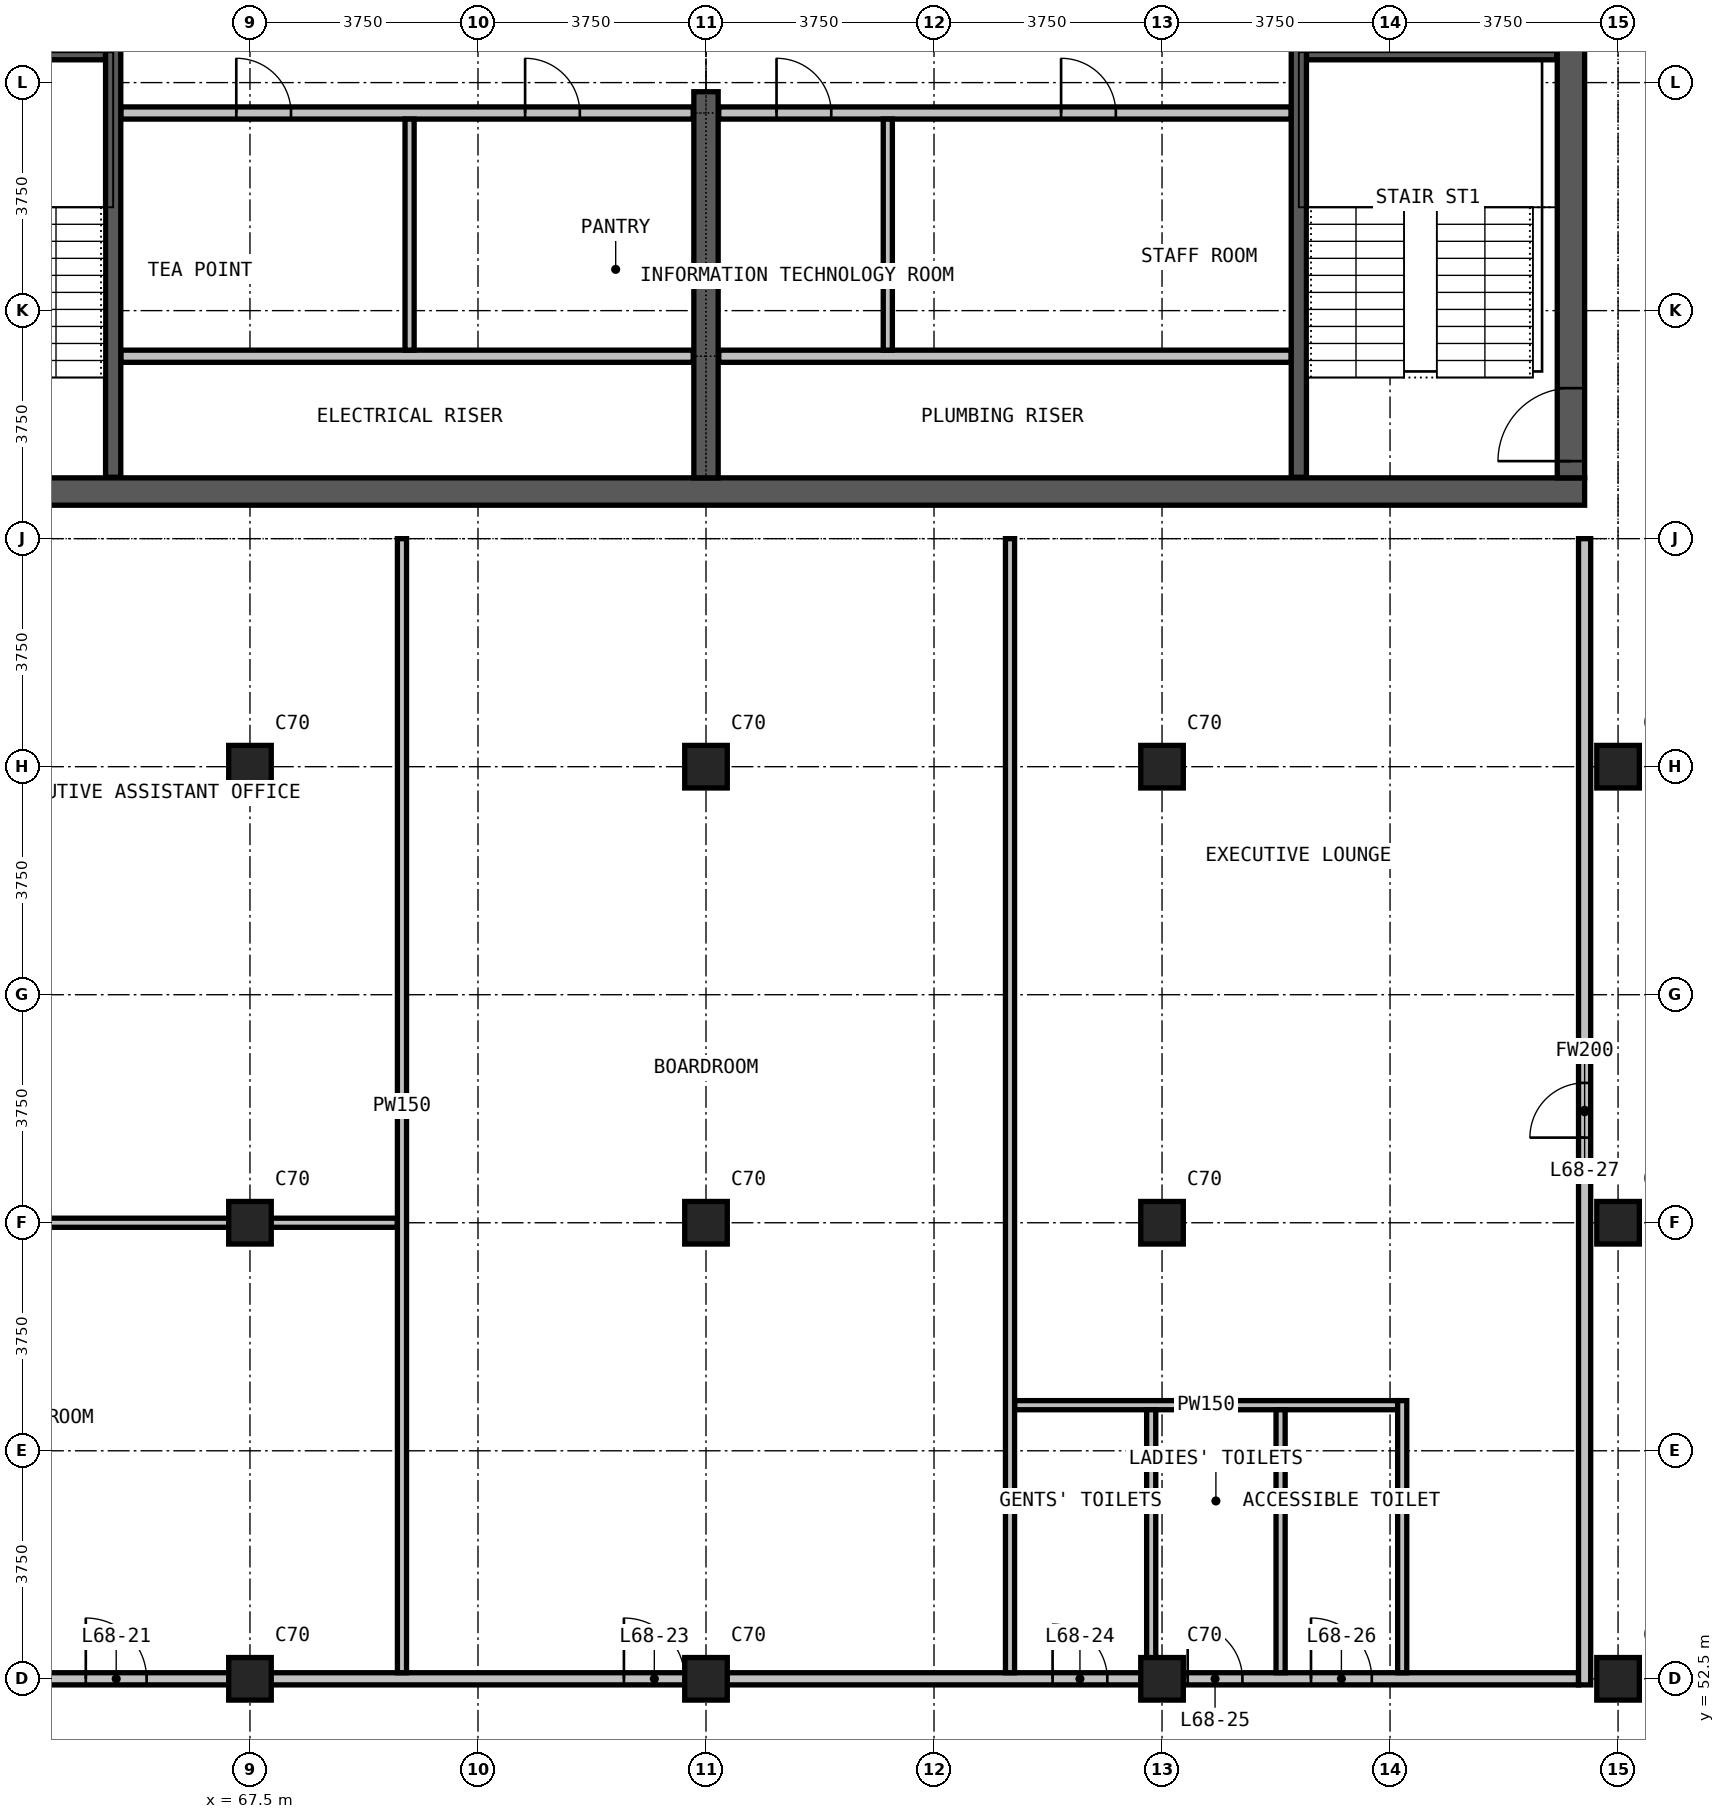
"""IFC4 building model, lengths in metres.
Left out: names, types, materials, properties, quantities, classifications, styles, units other than length and angle.
Written with IfcOpenShell. Run it as: python <this file> out.ifc"""

import sys

from ifc_helpers import new_model, si_unit, direction, frame, frame_2d, origin, origin_2d, place, context, subcontext, project, spatial, rectangle, extrude, element, fill, save


model = new_model("IFC4")
c1 = context("Model", 3, precision=1e-05, world=origin(), true_north=direction((0.0, 1.0)))
c2 = subcontext(c1, "Body", "Model", "MODEL_VIEW")
j1 = project(units=[si_unit("LENGTHUNIT", "METRE"), si_unit("PLANEANGLEUNIT", "RADIAN")], contexts=[c1])
p1 = place(None, origin())
s1 = spatial("IfcSite", under=j1, at=p1, CompositionType="ELEMENT")
p2 = place(p1, origin())
s2 = spatial("IfcBuilding", under=s1, at=p2, CompositionType="ELEMENT")
p3 = place(p2, frame((0.0, 0.0, 262.1)))
s3 = spatial("IfcBuildingStorey", under=s2, at=p3, CompositionType="ELEMENT", Elevation=262.1)
for number, where, z_axis, x_axis in (
    (1, (67.5, 52.5, 0.0), (0.0, 0.0, 1.0), (1.0, 0.0, 0.0)),
    (2, (67.5, 60.0, 0.0), (0.0, 0.0, 1.0), (1.0, 0.0, 0.0)),
    (3, (67.5, 67.5, 0.0), (0.0, 0.0, 1.0), (1.0, 0.0, 0.0)),
    (4, (75.0, 52.5, 0.0), (0.0, 0.0, 1.0), (1.0, 0.0, 0.0)),
    (5, (75.0, 60.0, 0.0), (0.0, 0.0, 1.0), (1.0, 0.0, 0.0)),
    (6, (75.0, 67.5, 0.0), (0.0, 0.0, 1.0), (1.0, 0.0, 0.0)),
    (7, (82.5, 52.5, 0.0), (0.0, 0.0, 1.0), (1.0, 0.0, 0.0)),
    (8, (82.5, 60.0, 0.0), (0.0, 0.0, 1.0), (1.0, 0.0, 0.0)),
    (9, (82.5, 67.5, 0.0), (0.0, 0.0, 1.0), (1.0, 0.0, 0.0)),
    (10, (90.0, 52.5, 0.0), (0.0, 0.0, 1.0), (1.0, 0.0, 0.0)),
    (11, (90.0, 60.0, 0.0), (0.0, 0.0, 1.0), (1.0, 0.0, 0.0)),
    (12, (90.0, 67.5, 0.0), (0.0, 0.0, 1.0), (1.0, 0.0, 0.0)),
):
    element("IfcColumn", number, at=place(p3, frame(where, z_axis=z_axis, x_axis=x_axis)), inside=s3, PredefinedType="COLUMN", context=c2, shape_type="SweptSolid", body=[
        extrude(rectangle(XDim=0.7, YDim=0.7, at=origin_2d()), origin(), (0.0, 0.0, 1.0), 3.6),
    ])
p4 = place(p3, frame((60.55, 72.025, 0.0), z_axis=(0.0, 0.0, 1.0), x_axis=(1.0, 0.0, 0.0)))
e13 = element("IfcWall", 13, at=p4, inside=s3, PredefinedType="SHEAR", context=c2, shape_type="SweptSolid", body=[
    extrude(rectangle(XDim=28.9, YDim=0.45, at=frame_2d((14.45, 0.0))), origin(), (0.0, 0.0, 1.0), 3.6),
])
p5 = place(p3, frame((89.225, 72.25, 0.0), z_axis=(0.0, 0.0, 1.0), x_axis=(0.0, 1.0, 0.0)))
e14 = element("IfcWall", 14, at=p5, inside=s3, PredefinedType="SHEAR", context=c2, shape_type="SweptSolid", body=[
    extrude(rectangle(XDim=20.5, YDim=0.45, at=frame_2d((10.25, 0.0))), origin(), (0.0, 0.0, 1.0), 3.6),
])
p6 = place(p5, frame((0.275, 0.0, 0.0)))
e15 = element("IfcOpeningElement", 15, at=p6, cuts=e14, PredefinedType="OPENING", context=c2, shape_type="SweptSolid", body=[
    extrude(rectangle(XDim=1.2, YDim=2.2, at=frame_2d((0.6, 1.1))), frame((0.0, 0.235, 0.0), z_axis=(0.0, -1.0, 0.0), x_axis=(1.0, 0.0, 0.0)), (0.0, 0.0, 1.0), 0.47),
])
p7 = place(p5, frame((13.775, 0.0, 0.0)))
e16 = element("IfcOpeningElement", 16, at=p7, cuts=e14, PredefinedType="OPENING", context=c2, shape_type="SweptSolid", body=[
    extrude(rectangle(XDim=1.2, YDim=2.2, at=frame_2d((0.6, 1.1))), frame((0.0, 0.235, 0.0), z_axis=(0.0, -1.0, 0.0), x_axis=(1.0, 0.0, 0.0)), (0.0, 0.0, 1.0), 0.47),
])
p8 = place(p5, frame((7.875, 0.0, 0.0)))
e17 = element("IfcOpeningElement", 17, at=p8, cuts=e14, PredefinedType="OPENING", context=c2, shape_type="SweptSolid", body=[
    extrude(rectangle(XDim=1.5, YDim=2.2, at=frame_2d((0.75, 1.1))), frame((0.0, 0.235, 0.0), z_axis=(0.0, -1.0, 0.0), x_axis=(1.0, 0.0, 0.0)), (0.0, 0.0, 1.0), 0.47),
])
p9 = place(p3, frame((75.0, 72.25, 0.0), z_axis=(0.0, 0.0, 1.0), x_axis=(0.0, 1.0, 0.0)))
e18 = element("IfcWall", 18, at=p9, inside=s3, PredefinedType="SHEAR", context=c2, shape_type="SweptSolid", body=[
    extrude(rectangle(XDim=6.35, YDim=0.4, at=frame_2d((3.175, 0.0))), origin(), (0.0, 0.0, 1.0), 3.6),
])
for number, where, z_axis, x_axis in (
    (19, (65.375, 74.25, 0.0), (0.0, 0.0, 1.0), (1.0, 0.0, 0.0)),
    (20, (75.21, 74.25, 0.0), (0.0, 0.0, 1.0), (1.0, 0.0, 0.0)),
):
    element("IfcWall", number, at=place(p3, frame(where, z_axis=z_axis, x_axis=x_axis)), inside=s3, PredefinedType="PARTITIONING", context=c2, shape_type="SweptSolid", body=[
        extrude(rectangle(XDim=9.415, YDim=0.2, at=frame_2d((4.708, 0.0))), origin(), (0.0, 0.0, 1.0), 3.3),
    ])
p10 = place(p3, frame((65.375, 78.25, 0.0), z_axis=(0.0, 0.0, 1.0), x_axis=(1.0, 0.0, 0.0)))
e21 = element("IfcWall", 21, at=p10, inside=s3, PredefinedType="PARTITIONING", context=c2, shape_type="SweptSolid", body=[
    extrude(rectangle(XDim=9.415, YDim=0.2, at=frame_2d((4.708, 0.0))), origin(), (0.0, 0.0, 1.0), 3.3),
])
p11 = place(p10, frame((1.9, 0.0, 0.0)))
e22 = element("IfcOpeningElement", 22, at=p11, cuts=e21, PredefinedType="OPENING", context=c2, shape_type="SweptSolid", body=[
    extrude(rectangle(XDim=0.9, YDim=2.2, at=frame_2d((0.45, 1.1))), frame((0.0, 0.11, 0.0), z_axis=(0.0, -1.0, 0.0), x_axis=(1.0, 0.0, 0.0)), (0.0, 0.0, 1.0), 0.22),
])
p12 = place(p10, frame((6.65, 0.0, 0.0)))
e23 = element("IfcOpeningElement", 23, at=p12, cuts=e21, PredefinedType="OPENING", context=c2, shape_type="SweptSolid", body=[
    extrude(rectangle(XDim=0.9, YDim=2.2, at=frame_2d((0.45, 1.1))), frame((0.0, 0.11, 0.0), z_axis=(0.0, -1.0, 0.0), x_axis=(1.0, 0.0, 0.0)), (0.0, 0.0, 1.0), 0.22),
])
p13 = place(p3, frame((75.21, 78.25, 0.0), z_axis=(0.0, 0.0, 1.0), x_axis=(1.0, 0.0, 0.0)))
e24 = element("IfcWall", 24, at=p13, inside=s3, PredefinedType="PARTITIONING", context=c2, shape_type="SweptSolid", body=[
    extrude(rectangle(XDim=9.415, YDim=0.2, at=frame_2d((4.708, 0.0))), origin(), (0.0, 0.0, 1.0), 3.3),
])
p14 = place(p13, frame((0.95, 0.0, 0.0)))
e25 = element("IfcOpeningElement", 25, at=p14, cuts=e24, PredefinedType="OPENING", context=c2, shape_type="SweptSolid", body=[
    extrude(rectangle(XDim=0.9, YDim=2.2, at=frame_2d((0.45, 1.1))), frame((0.0, 0.11, 0.0), z_axis=(0.0, -1.0, 0.0), x_axis=(1.0, 0.0, 0.0)), (0.0, 0.0, 1.0), 0.22),
])
p15 = place(p13, frame((5.63, 0.0, 0.0)))
e26 = element("IfcOpeningElement", 26, at=p15, cuts=e24, PredefinedType="OPENING", context=c2, shape_type="SweptSolid", body=[
    extrude(rectangle(XDim=0.9, YDim=2.2, at=frame_2d((0.45, 1.1))), frame((0.0, 0.11, 0.0), z_axis=(0.0, -1.0, 0.0), x_axis=(1.0, 0.0, 0.0)), (0.0, 0.0, 1.0), 0.22),
])
p16 = place(p3, frame((60.65, 52.5, 0.0), z_axis=(0.0, 0.0, 1.0), x_axis=(1.0, 0.0, 0.0)))
e27 = element("IfcWall", 27, at=p16, inside=s3, PredefinedType="PARTITIONING", context=c2, shape_type="SweptSolid", body=[
    extrude(rectangle(XDim=28.7, YDim=0.2, at=frame_2d((14.35, 0.0))), origin(), (0.0, 0.0, 1.0), 3.3),
])
p17 = place(p16, frame((4.15, 0.0, 0.0)))
e28 = element("IfcOpeningElement", 28, at=p17, cuts=e27, PredefinedType="OPENING", context=c2, shape_type="SweptSolid", body=[
    extrude(rectangle(XDim=1.0, YDim=2.2, at=frame_2d((0.5, 1.1))), frame((0.0, 0.11, 0.0), z_axis=(0.0, -1.0, 0.0), x_axis=(1.0, 0.0, 0.0)), (0.0, 0.0, 1.0), 0.22),
])
p18 = place(p16, frame((13.0, 0.0, 0.0)))
e29 = element("IfcOpeningElement", 29, at=p18, cuts=e27, PredefinedType="OPENING", context=c2, shape_type="SweptSolid", body=[
    extrude(rectangle(XDim=1.0, YDim=2.2, at=frame_2d((0.5, 1.1))), frame((0.0, 0.11, 0.0), z_axis=(0.0, -1.0, 0.0), x_axis=(1.0, 0.0, 0.0)), (0.0, 0.0, 1.0), 0.22),
])
p19 = place(p16, frame((20.05, 0.0, 0.0)))
e30 = element("IfcOpeningElement", 30, at=p19, cuts=e27, PredefinedType="OPENING", context=c2, shape_type="SweptSolid", body=[
    extrude(rectangle(XDim=0.9, YDim=2.2, at=frame_2d((0.45, 1.1))), frame((0.0, 0.11, 0.0), z_axis=(0.0, -1.0, 0.0), x_axis=(1.0, 0.0, 0.0)), (0.0, 0.0, 1.0), 0.22),
])
p20 = place(p16, frame((22.272, 0.0, 0.0)))
e31 = element("IfcOpeningElement", 31, at=p20, cuts=e27, PredefinedType="OPENING", context=c2, shape_type="SweptSolid", body=[
    extrude(rectangle(XDim=0.9, YDim=2.2, at=frame_2d((0.45, 1.1))), frame((0.0, 0.11, 0.0), z_axis=(0.0, -1.0, 0.0), x_axis=(1.0, 0.0, 0.0)), (0.0, 0.0, 1.0), 0.22),
])
p21 = place(p16, frame((24.3, 0.0, 0.0)))
e32 = element("IfcOpeningElement", 32, at=p21, cuts=e27, PredefinedType="OPENING", context=c2, shape_type="SweptSolid", body=[
    extrude(rectangle(XDim=1.0, YDim=2.2, at=frame_2d((0.5, 1.1))), frame((0.0, 0.11, 0.0), z_axis=(0.0, -1.0, 0.0), x_axis=(1.0, 0.0, 0.0)), (0.0, 0.0, 1.0), 0.22),
])
p22 = place(p3, frame((89.45, 52.4, 0.0), z_axis=(0.0, 0.0, 1.0), x_axis=(0.0, 1.0, 0.0)))
e33 = element("IfcWall", 33, at=p22, inside=s3, PredefinedType="PARTITIONING", context=c2, shape_type="SweptSolid", body=[
    extrude(rectangle(XDim=18.85, YDim=0.2, at=frame_2d((9.425, 0.0))), origin(), (0.0, 0.0, 1.0), 3.3),
])
p23 = place(p22, frame((9.0, 0.0, 0.0)))
e34 = element("IfcOpeningElement", 34, at=p23, cuts=e33, PredefinedType="OPENING", context=c2, shape_type="SweptSolid", body=[
    extrude(rectangle(XDim=0.9, YDim=2.2, at=frame_2d((0.45, 1.1))), frame((0.0, 0.11, 0.0), z_axis=(0.0, -1.0, 0.0), x_axis=(1.0, 0.0, 0.0)), (0.0, 0.0, 1.0), 0.22),
])
p24 = place(p3, frame((80.075, 57.0, 0.0), z_axis=(0.0, 0.0, 1.0), x_axis=(1.0, 0.0, 0.0)))
e35 = element("IfcWall", 35, at=p24, inside=s3, PredefinedType="PARTITIONING", context=c2, shape_type="SweptSolid", body=[
    extrude(rectangle(XDim=6.3, YDim=0.15, at=frame_2d((3.15, 0.0))), origin(), (0.0, 0.0, 1.0), 3.3),
])
p25 = place(p3, frame((60.65, 60.0, 0.0), z_axis=(0.0, 0.0, 1.0), x_axis=(1.0, 0.0, 0.0)))
e36 = element("IfcWall", 36, at=p25, inside=s3, PredefinedType="PARTITIONING", context=c2, shape_type="SweptSolid", body=[
    extrude(rectangle(XDim=9.275, YDim=0.15, at=frame_2d((4.638, 0.0))), origin(), (0.0, 0.0, 1.0), 3.3),
])
p26 = place(p3, frame((70.0, 52.6, 0.0), z_axis=(0.0, 0.0, 1.0), x_axis=(0.0, 1.0, 0.0)))
e37 = element("IfcWall", 37, at=p26, inside=s3, PredefinedType="PARTITIONING", context=c2, shape_type="SweptSolid", body=[
    extrude(rectangle(XDim=18.65, YDim=0.15, at=frame_2d((9.325, 0.0))), origin(), (0.0, 0.0, 1.0), 3.3),
])
for number, where, z_axis, x_axis in (
    (38, (70.125, 74.35, 0.0), (0.0, 0.0, 1.0), (0.0, 1.0, 0.0)),
    (39, (77.99, 74.35, 0.0), (0.0, 0.0, 1.0), (0.0, 1.0, 0.0)),
):
    element("IfcWall", number, at=place(p3, frame(where, z_axis=z_axis, x_axis=x_axis)), inside=s3, PredefinedType="PARTITIONING", context=c2, shape_type="SweptSolid", body=[
        extrude(rectangle(XDim=3.8, YDim=0.15, at=frame_2d((1.9, 0.0))), origin(), (0.0, 0.0, 1.0), 3.3),
    ])
p27 = place(p3, frame((80.0, 52.6, 0.0), z_axis=(0.0, 0.0, 1.0), x_axis=(0.0, 1.0, 0.0)))
e40 = element("IfcWall", 40, at=p27, inside=s3, PredefinedType="PARTITIONING", context=c2, shape_type="SweptSolid", body=[
    extrude(rectangle(XDim=18.65, YDim=0.15, at=frame_2d((9.325, 0.0))), origin(), (0.0, 0.0, 1.0), 3.3),
])
for number, where, z_axis, x_axis in (
    (41, (82.322, 52.6, 0.0), (0.0, 0.0, 1.0), (0.0, 1.0, 0.0)),
    (42, (84.45, 52.6, 0.0), (0.0, 0.0, 1.0), (0.0, 1.0, 0.0)),
):
    element("IfcWall", number, at=place(p3, frame(where, z_axis=z_axis, x_axis=x_axis)), inside=s3, PredefinedType="PARTITIONING", context=c2, shape_type="SweptSolid", body=[
        extrude(rectangle(XDim=4.325, YDim=0.15, at=frame_2d((2.163, 0.0))), origin(), (0.0, 0.0, 1.0), 3.3),
    ])
p28 = place(p3, frame((86.45, 52.6, 0.0), z_axis=(0.0, 0.0, 1.0), x_axis=(0.0, 1.0, 0.0)))
e43 = element("IfcWall", 43, at=p28, inside=s3, PredefinedType="PARTITIONING", context=c2, shape_type="SweptSolid", body=[
    extrude(rectangle(XDim=4.475, YDim=0.15, at=frame_2d((2.237, 0.0))), origin(), (0.0, 0.0, 1.0), 3.3),
])
p29 = place(p3, frame((61.0, 79.25, 0.0), z_axis=(0.0, 0.0, 1.0), x_axis=(1.0, 0.0, 0.0)))
e44 = element("IfcWall", 44, at=p29, inside=s3, PredefinedType="PARTITIONING", context=c2, shape_type="SweptSolid", body=[
    extrude(rectangle(XDim=4.125, YDim=0.25, at=frame_2d((2.062, 0.0))), origin(), (0.0, 0.0, 1.0), 3.3),
])
p30 = place(p3, frame((84.875, 79.25, 0.0), z_axis=(0.0, 0.0, 1.0), x_axis=(1.0, 0.0, 0.0)))
e45 = element("IfcWall", 45, at=p30, inside=s3, PredefinedType="PARTITIONING", context=c2, shape_type="SweptSolid", body=[
    extrude(rectangle(XDim=4.115, YDim=0.25, at=frame_2d((2.058, 0.0))), origin(), (0.0, 0.0, 1.0), 3.3),
])
for number, where, z_axis, x_axis in (
    (46, (65.25, 72.26, 0.0), (0.0, 0.0, 1.0), (0.0, 1.0, 0.0)),
    (47, (84.75, 72.26, 0.0), (0.0, 0.0, 1.0), (0.0, 1.0, 0.0)),
):
    element("IfcWall", number, at=place(p3, frame(where, z_axis=z_axis, x_axis=x_axis)), inside=s3, PredefinedType="PARTITIONING", context=c2, shape_type="SweptSolid", body=[
        extrude(rectangle(XDim=7.115, YDim=0.25, at=frame_2d((3.558, 0.0))), origin(), (0.0, 0.0, 1.0), 3.3),
    ])
p31 = place(p6, origin())
e48 = element("IfcDoor", 48, at=p31, inside=s3, OperationType="SINGLE_SWING_LEFT", PredefinedType="DOOR", context=c2, shape_type="SweptSolid", body=[
    extrude(rectangle(XDim=1.2, YDim=2.2, at=frame_2d((0.6, 1.1))), frame((0.0, 0.025, 0.0), z_axis=(0.0, -1.0, 0.0), x_axis=(1.0, 0.0, 0.0)), (0.0, 0.0, 1.0), 0.05),
])
fill(e15, e48)
p32 = place(p11, origin())
e49 = element("IfcDoor", 49, at=p32, inside=s3, OperationType="SINGLE_SWING_RIGHT", PredefinedType="DOOR", context=c2, shape_type="SweptSolid", body=[
    extrude(rectangle(XDim=0.9, YDim=2.2, at=frame_2d((0.45, 1.1))), frame((0.0, 0.025, 0.0), z_axis=(0.0, -1.0, 0.0), x_axis=(1.0, 0.0, 0.0)), (0.0, 0.0, 1.0), 0.05),
])
fill(e22, e49)
p33 = place(p12, origin())
e50 = element("IfcDoor", 50, at=p33, inside=s3, OperationType="SINGLE_SWING_LEFT", PredefinedType="DOOR", context=c2, shape_type="SweptSolid", body=[
    extrude(rectangle(XDim=0.9, YDim=2.2, at=frame_2d((0.45, 1.1))), frame((0.0, 0.025, 0.0), z_axis=(0.0, -1.0, 0.0), x_axis=(1.0, 0.0, 0.0)), (0.0, 0.0, 1.0), 0.05),
])
fill(e23, e50)
p34 = place(p14, origin())
e51 = element("IfcDoor", 51, at=p34, inside=s3, OperationType="SINGLE_SWING_RIGHT", PredefinedType="DOOR", context=c2, shape_type="SweptSolid", body=[
    extrude(rectangle(XDim=0.9, YDim=2.2, at=frame_2d((0.45, 1.1))), frame((0.0, 0.025, 0.0), z_axis=(0.0, -1.0, 0.0), x_axis=(1.0, 0.0, 0.0)), (0.0, 0.0, 1.0), 0.05),
])
fill(e25, e51)
p35 = place(p15, origin())
e52 = element("IfcDoor", 52, at=p35, inside=s3, OperationType="SINGLE_SWING_RIGHT", PredefinedType="DOOR", context=c2, shape_type="SweptSolid", body=[
    extrude(rectangle(XDim=0.9, YDim=2.2, at=frame_2d((0.45, 1.1))), frame((0.0, 0.025, 0.0), z_axis=(0.0, -1.0, 0.0), x_axis=(1.0, 0.0, 0.0)), (0.0, 0.0, 1.0), 0.05),
])
fill(e26, e52)
p36 = place(p17, origin())
e53 = element("IfcDoor", 53, at=p36, inside=s3, OperationType="SINGLE_SWING_LEFT", PredefinedType="DOOR", context=c2, shape_type="SweptSolid", body=[
    extrude(rectangle(XDim=1.0, YDim=2.2, at=frame_2d((0.5, 1.1))), frame((0.0, 0.025, 0.0), z_axis=(0.0, -1.0, 0.0), x_axis=(1.0, 0.0, 0.0)), (0.0, 0.0, 1.0), 0.05),
])
fill(e28, e53)
p37 = place(p18, origin())
e54 = element("IfcDoor", 54, at=p37, inside=s3, OperationType="SINGLE_SWING_RIGHT", PredefinedType="DOOR", context=c2, shape_type="SweptSolid", body=[
    extrude(rectangle(XDim=1.0, YDim=2.2, at=frame_2d((0.5, 1.1))), frame((0.0, 0.025, 0.0), z_axis=(0.0, -1.0, 0.0), x_axis=(1.0, 0.0, 0.0)), (0.0, 0.0, 1.0), 0.05),
])
fill(e29, e54)
p38 = place(p19, origin())
e55 = element("IfcDoor", 55, at=p38, inside=s3, OperationType="SINGLE_SWING_LEFT", PredefinedType="DOOR", context=c2, shape_type="SweptSolid", body=[
    extrude(rectangle(XDim=0.9, YDim=2.2, at=frame_2d((0.45, 1.1))), frame((0.0, 0.025, 0.0), z_axis=(0.0, -1.0, 0.0), x_axis=(1.0, 0.0, 0.0)), (0.0, 0.0, 1.0), 0.05),
])
fill(e30, e55)
p39 = place(p20, origin())
e56 = element("IfcDoor", 56, at=p39, inside=s3, OperationType="SINGLE_SWING_RIGHT", PredefinedType="DOOR", context=c2, shape_type="SweptSolid", body=[
    extrude(rectangle(XDim=0.9, YDim=2.2, at=frame_2d((0.45, 1.1))), frame((0.0, 0.025, 0.0), z_axis=(0.0, -1.0, 0.0), x_axis=(1.0, 0.0, 0.0)), (0.0, 0.0, 1.0), 0.05),
])
fill(e31, e56)
p40 = place(p21, origin())
e57 = element("IfcDoor", 57, at=p40, inside=s3, OperationType="SINGLE_SWING_RIGHT", PredefinedType="DOOR", context=c2, shape_type="SweptSolid", body=[
    extrude(rectangle(XDim=1.0, YDim=2.2, at=frame_2d((0.5, 1.1))), frame((0.0, 0.025, 0.0), z_axis=(0.0, -1.0, 0.0), x_axis=(1.0, 0.0, 0.0)), (0.0, 0.0, 1.0), 0.05),
])
fill(e32, e57)
p41 = place(p23, origin())
e58 = element("IfcDoor", 58, at=p41, inside=s3, OperationType="SINGLE_SWING_LEFT", PredefinedType="DOOR", context=c2, shape_type="SweptSolid", body=[
    extrude(rectangle(XDim=0.9, YDim=2.2, at=frame_2d((0.45, 1.1))), frame((0.0, 0.025, 0.0), z_axis=(0.0, -1.0, 0.0), x_axis=(1.0, 0.0, 0.0)), (0.0, 0.0, 1.0), 0.05),
])
fill(e34, e58)
save(model, sys.argv[1])
